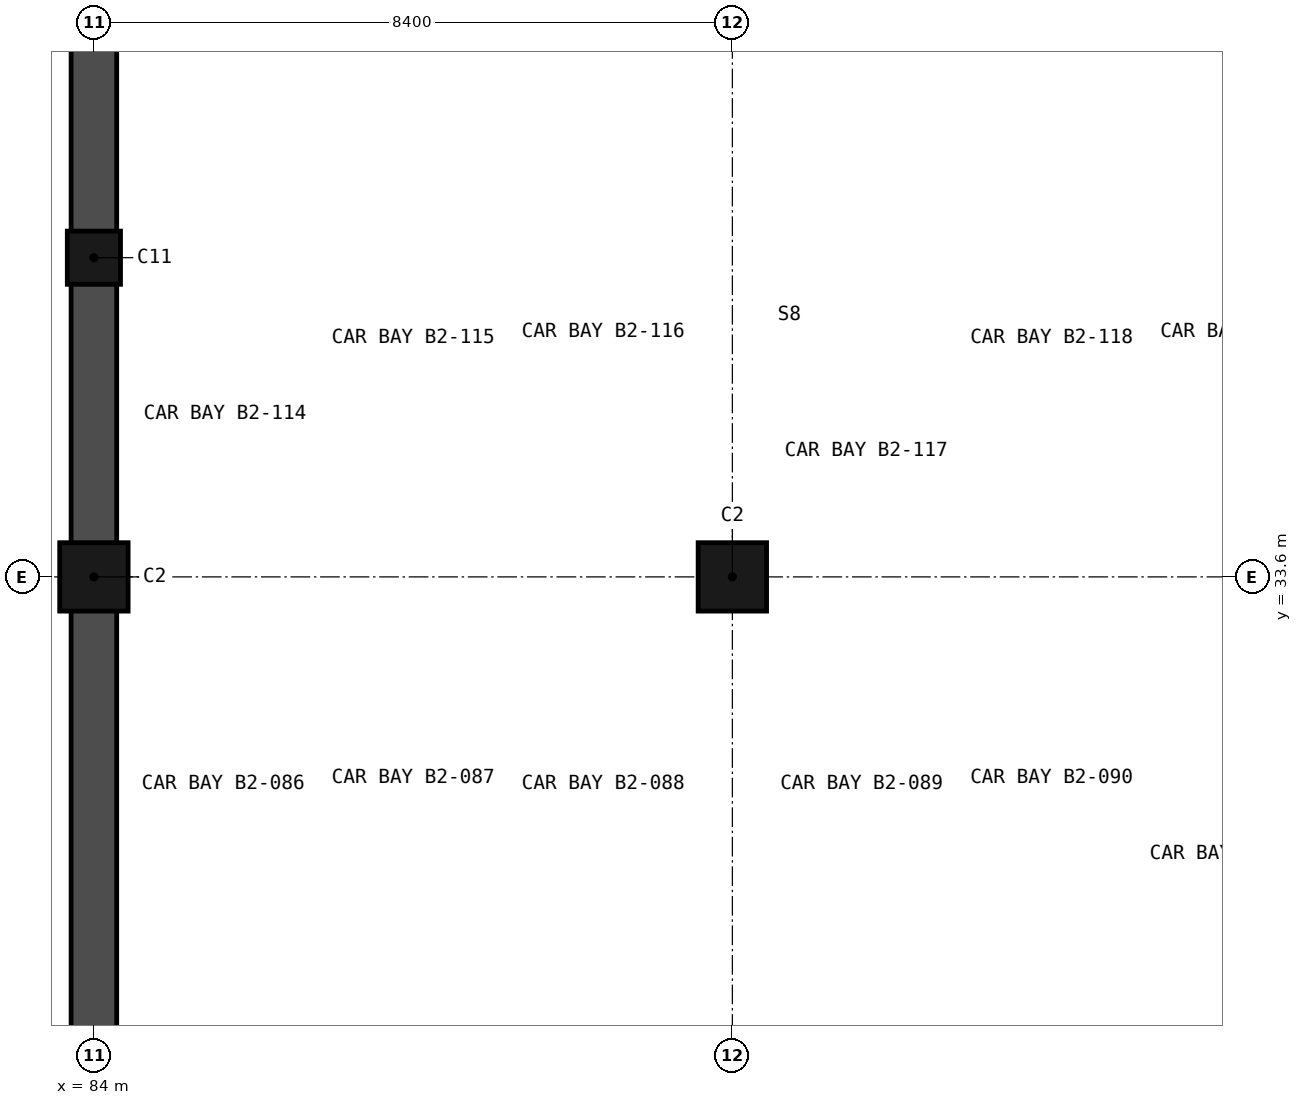
"""IFC4 building model, lengths in metres.
Left out: names, types, materials, properties, quantities, classifications, styles, units other than length and angle.
Written with IfcOpenShell. Run it as: python <this file> out.ifc"""

import sys

from ifc_helpers import new_model, si_unit, direction, frame, frame_2d, origin, origin_2d, place, context, subcontext, project, spatial, rectangle, circle, extrude, element, save


model = new_model("IFC4")
c1 = context("Model", 3, precision=1e-05, world=origin(), true_north=direction((0.0, 1.0)))
c2 = subcontext(c1, "Body", "Model", "MODEL_VIEW")
j1 = project(units=[si_unit("LENGTHUNIT", "METRE"), si_unit("PLANEANGLEUNIT", "RADIAN")], contexts=[c1])
p1 = place(None, origin())
s1 = spatial("IfcSite", under=j1, at=p1, CompositionType="ELEMENT")
p2 = place(p1, origin())
s2 = spatial("IfcBuilding", under=s1, at=p2, CompositionType="ELEMENT")
p3 = place(p2, frame((0.0, 0.0, -9.6)))
s3 = spatial("IfcBuildingStorey", under=s2, at=p3, CompositionType="ELEMENT", Elevation=-9.6)
for number, where, z_axis, x_axis in (
    (1, (84.0, 33.6, -0.25), (0.0, 0.0, 1.0), (1.0, 0.0, 0.0)),
    (2, (92.4, 33.6, -0.25), (0.0, 0.0, 1.0), (1.0, 0.0, 0.0)),
):
    element("IfcColumn", number, at=place(p3, frame(where, z_axis=z_axis, x_axis=x_axis)), inside=s3, PredefinedType="COLUMN", context=c2, shape_type="SweptSolid", body=[
        extrude(rectangle(XDim=0.9, YDim=0.9, at=origin_2d()), origin(), (0.0, 0.0, 1.0), 4.75),
    ])
p4 = place(p3, frame((84.0, 37.8, -0.25), z_axis=(0.0, 0.0, 1.0), x_axis=(1.0, 0.0, 0.0)))
e3 = element("IfcColumn", 3, at=p4, inside=s3, PredefinedType="COLUMN", context=c2, shape_type="SweptSolid", body=[
    extrude(circle(Radius=0.35, at=origin_2d()), origin(), (0.0, 0.0, 1.0), 4.75),
])
p5 = place(p3, frame((84.0, 50.7, -0.25), z_axis=(0.0, 0.0, 1.0), x_axis=(0.0, -1.0, 0.0)))
e4 = element("IfcWall", 4, at=p5, inside=s3, PredefinedType="SOLIDWALL", context=c2, shape_type="SweptSolid", body=[
    extrude(rectangle(XDim=51.0, YDim=0.6, at=frame_2d((25.5, 0.0))), origin(), (0.0, 0.0, 1.0), 4.75),
])
save(model, sys.argv[1])
